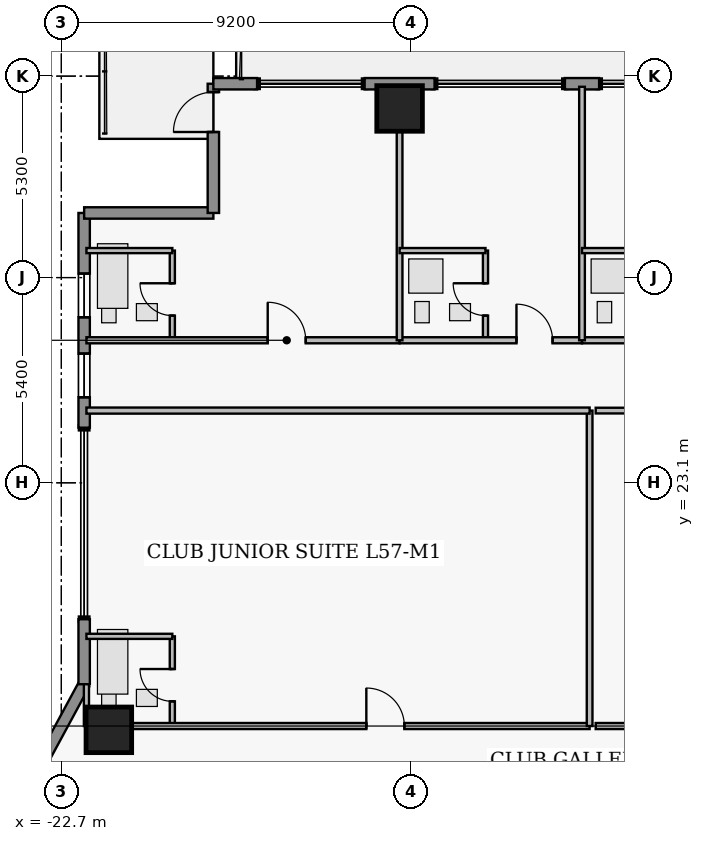
"""IFC4 building model, lengths in metres.
Left out: names, types, materials, properties, quantities, classifications, styles, units other than length and angle.
Written with IfcOpenShell. Run it as: python <this file> out.ifc"""

import sys

from ifc_helpers import new_model, si_unit, direction, frame, frame_2d, origin, origin_2d, place, context, subcontext, project, spatial, rectangle, extrude, element, fill, save


model = new_model("IFC4")
c1 = context("Model", 3, precision=1e-05, world=origin(), true_north=direction((0.0, 1.0)))
c2 = subcontext(c1, "Body", "Model", "MODEL_VIEW")
j1 = project(units=[si_unit("LENGTHUNIT", "METRE"), si_unit("PLANEANGLEUNIT", "RADIAN")], contexts=[c1])
p1 = place(None, origin())
s1 = spatial("IfcSite", under=j1, at=p1, CompositionType="ELEMENT")
p2 = place(p1, origin())
s2 = spatial("IfcBuilding", under=s1, at=p2, CompositionType="ELEMENT")
p3 = place(p2, frame((0.0, 0.0, 226.15)))
s3 = spatial("IfcBuildingStorey", under=s2, at=p3, CompositionType="ELEMENT", Elevation=226.15)
for number, where, z_axis, x_axis in (
    (1, (-13.8, 32.95, 0.0), (0.0, 0.0, 1.0), (1.0, 0.0, 0.0)),
    (2, (-21.45, 16.6, 0.0), (0.0, 0.0, 1.0), (1.0, 0.0, 0.0)),
):
    element("IfcColumn", number, at=place(p3, frame(where, z_axis=z_axis, x_axis=x_axis)), inside=s3, PredefinedType="COLUMN", context=c2, shape_type="SweptSolid", body=[
        extrude(rectangle(XDim=1.2, YDim=1.2, at=origin_2d()), origin(), (0.0, 0.0, 1.0), 3.75),
    ])
p4 = place(p3, frame((-24.7, 13.0, 0.0), z_axis=(0.0, 0.0, 1.0), x_axis=(0.476258655584, 0.879305233114, 0.0)))
e3 = element("IfcWall", 3, at=p4, inside=s3, PredefinedType="STANDARD", context=c2, shape_type="SweptSolid", body=[
    extrude(rectangle(XDim=5.459, YDim=0.3, at=frame_2d((2.729, 0.0))), origin(), (0.0, 0.0, 1.0), 3.53),
])
p5 = place(p3, frame((-22.1, 17.8, 0.0), z_axis=(0.0, 0.0, 1.0), x_axis=(0.0, 1.0, 0.0)))
e4 = element("IfcWall", 4, at=p5, inside=s3, PredefinedType="STANDARD", context=c2, shape_type="SweptSolid", body=[
    extrude(rectangle(XDim=1.71, YDim=0.3, at=frame_2d((0.855, 0.0))), origin(), (0.0, 0.0, 1.0), 3.53),
])
p6 = place(p3, frame((-22.1, 24.55, 0.0), z_axis=(0.0, 0.0, 1.0), x_axis=(0.0, 1.0, 0.0)))
e5 = element("IfcWall", 5, at=p6, inside=s3, PredefinedType="STANDARD", context=c2, shape_type="SweptSolid", body=[
    extrude(rectangle(XDim=5.65, YDim=0.3, at=frame_2d((2.825, 0.0))), origin(), (0.0, 0.0, 1.0), 3.53),
])
p7 = place(p6, frame((0.8, 0.0, 0.95)))
e6 = element("IfcOpeningElement", 6, at=p7, cuts=e5, PredefinedType="OPENING", context=c2, shape_type="SweptSolid", body=[
    extrude(rectangle(XDim=1.15, YDim=1.55, at=frame_2d((0.575, 0.775))), frame((0.0, 0.16, 0.0), z_axis=(0.0, -1.0, 0.0), x_axis=(1.0, 0.0, 0.0)), (0.0, 0.0, 1.0), 0.32),
])
p8 = place(p6, frame((2.905, 0.0, 0.95)))
e7 = element("IfcOpeningElement", 7, at=p8, cuts=e5, PredefinedType="OPENING", context=c2, shape_type="SweptSolid", body=[
    extrude(rectangle(XDim=1.15, YDim=1.55, at=frame_2d((0.575, 0.775))), frame((0.0, 0.16, 0.0), z_axis=(0.0, -1.0, 0.0), x_axis=(1.0, 0.0, 0.0)), (0.0, 0.0, 1.0), 0.32),
])
p9 = place(p3, frame((-22.1, 30.2, 0.0), z_axis=(0.0, 0.0, 1.0), x_axis=(1.0, 0.0, 0.0)))
e8 = element("IfcWall", 8, at=p9, inside=s3, PredefinedType="STANDARD", context=c2, shape_type="SweptSolid", body=[
    extrude(rectangle(XDim=3.4, YDim=0.3, at=frame_2d((1.7, 0.0))), origin(), (0.0, 0.0, 1.0), 3.53),
])
p10 = place(p3, frame((-18.7, 30.2, 0.0), z_axis=(0.0, 0.0, 1.0), x_axis=(0.0, 1.0, 0.0)))
e9 = element("IfcWall", 9, at=p10, inside=s3, PredefinedType="STANDARD", context=c2, shape_type="SweptSolid", body=[
    extrude(rectangle(XDim=3.4, YDim=0.3, at=frame_2d((1.7, 0.0))), origin(), (0.0, 0.0, 1.0), 3.53),
])
p11 = place(p10, frame((2.13, 0.0, 0.0)))
e10 = element("IfcOpeningElement", 10, at=p11, cuts=e9, PredefinedType="OPENING", context=c2, shape_type="SweptSolid", body=[
    extrude(rectangle(XDim=1.05, YDim=2.2, at=frame_2d((0.525, 1.1))), frame((0.0, 0.16, 0.0), z_axis=(0.0, -1.0, 0.0), x_axis=(1.0, 0.0, 0.0)), (0.0, 0.0, 1.0), 0.32),
])
p12 = place(p3, frame((-18.7, 33.6, 0.0), z_axis=(0.0, 0.0, 1.0), x_axis=(1.0, 0.0, 0.0)))
e11 = element("IfcWall", 11, at=p12, inside=s3, PredefinedType="STANDARD", context=c2, shape_type="SweptSolid", body=[
    extrude(rectangle(XDim=1.15, YDim=0.3, at=frame_2d((0.575, 0.0))), origin(), (0.0, 0.0, 1.0), 3.53),
])
p13 = place(p3, frame((-14.72, 33.6, 0.0), z_axis=(0.0, 0.0, 1.0), x_axis=(1.0, 0.0, 0.0)))
e12 = element("IfcWall", 12, at=p13, inside=s3, PredefinedType="STANDARD", context=c2, shape_type="SweptSolid", body=[
    extrude(rectangle(XDim=1.84, YDim=0.3, at=frame_2d((0.92, 0.0))), origin(), (0.0, 0.0, 1.0), 3.53),
])
p14 = place(p3, frame((-9.45, 33.6, 0.0), z_axis=(0.0, 0.0, 1.0), x_axis=(1.0, 0.0, 0.0)))
e13 = element("IfcWall", 13, at=p14, inside=s3, PredefinedType="STANDARD", context=c2, shape_type="SweptSolid", body=[
    extrude(rectangle(XDim=0.9, YDim=0.3, at=frame_2d((0.45, 0.0))), origin(), (0.0, 0.0, 1.0), 3.53),
])
p15 = place(p3, frame((-19.78, 26.85, 0.0), z_axis=(0.0, 0.0, 1.0), x_axis=(0.0, 1.0, 0.0)))
e14 = element("IfcWall", 14, at=p15, inside=s3, PredefinedType="PLUMBINGWALL", context=c2, shape_type="SweptSolid", body=[
    extrude(rectangle(XDim=2.36, YDim=0.135, at=frame_2d((1.18, 0.0))), origin(), (0.0, 0.0, 1.0), 3.53),
])
p16 = place(p15, frame((0.65, 0.0, 0.0)))
e15 = element("IfcOpeningElement", 15, at=p16, cuts=e14, PredefinedType="OPENING", context=c2, shape_type="SweptSolid", body=[
    extrude(rectangle(XDim=0.85, YDim=2.1, at=frame_2d((0.425, 1.05))), frame((0.0, 0.077, 0.0), z_axis=(0.0, -1.0, 0.0), x_axis=(1.0, 0.0, 0.0)), (0.0, 0.0, 1.0), 0.155),
])
p17 = place(p3, frame((-22.04, 26.85, 0.0), z_axis=(0.0, 0.0, 1.0), x_axis=(1.0, 0.0, 0.0)))
e16 = element("IfcWall", 16, at=p17, inside=s3, PredefinedType="PARTITIONING", context=c2, shape_type="SweptSolid", body=[
    extrude(rectangle(XDim=8.24, YDim=0.16, at=frame_2d((4.12, 0.0))), origin(), (0.0, 0.0, 1.0), 3.53),
])
p18 = place(p17, frame((4.77, 0.0, 0.0)))
e17 = element("IfcOpeningElement", 17, at=p18, cuts=e16, PredefinedType="OPENING", context=c2, shape_type="SweptSolid", body=[
    extrude(rectangle(XDim=1.0, YDim=2.15, at=frame_2d((0.5, 1.075))), frame((0.0, 0.09, 0.0), z_axis=(0.0, -1.0, 0.0), x_axis=(1.0, 0.0, 0.0)), (0.0, 0.0, 1.0), 0.18),
])
p19 = place(p3, frame((-11.54, 26.85, 0.0), z_axis=(0.0, 0.0, 1.0), x_axis=(0.0, 1.0, 0.0)))
e18 = element("IfcWall", 18, at=p19, inside=s3, PredefinedType="PLUMBINGWALL", context=c2, shape_type="SweptSolid", body=[
    extrude(rectangle(XDim=2.36, YDim=0.135, at=frame_2d((1.18, 0.0))), origin(), (0.0, 0.0, 1.0), 3.53),
])
p20 = place(p19, frame((0.65, 0.0, 0.0)))
e19 = element("IfcOpeningElement", 19, at=p20, cuts=e18, PredefinedType="OPENING", context=c2, shape_type="SweptSolid", body=[
    extrude(rectangle(XDim=0.85, YDim=2.1, at=frame_2d((0.425, 1.05))), frame((0.0, 0.077, 0.0), z_axis=(0.0, -1.0, 0.0), x_axis=(1.0, 0.0, 0.0)), (0.0, 0.0, 1.0), 0.155),
])
p21 = place(p3, frame((-13.8, 26.85, 0.0), z_axis=(0.0, 0.0, 1.0), x_axis=(1.0, 0.0, 0.0)))
e20 = element("IfcWall", 20, at=p21, inside=s3, PredefinedType="PARTITIONING", context=c2, shape_type="SweptSolid", body=[
    extrude(rectangle(XDim=4.8, YDim=0.16, at=frame_2d((2.4, 0.0))), origin(), (0.0, 0.0, 1.0), 3.53),
])
p22 = place(p21, frame((3.075, 0.0, 0.0)))
e21 = element("IfcOpeningElement", 21, at=p22, cuts=e20, PredefinedType="OPENING", context=c2, shape_type="SweptSolid", body=[
    extrude(rectangle(XDim=0.95, YDim=2.15, at=frame_2d((0.475, 1.075))), frame((0.0, 0.09, 0.0), z_axis=(0.0, -1.0, 0.0), x_axis=(1.0, 0.0, 0.0)), (0.0, 0.0, 1.0), 0.18),
])
p23 = place(p3, frame((-9.0, 26.85, 0.0), z_axis=(0.0, 0.0, 1.0), x_axis=(1.0, 0.0, 0.0)))
e22 = element("IfcWall", 22, at=p23, inside=s3, PredefinedType="PARTITIONING", context=c2, shape_type="SweptSolid", body=[
    extrude(rectangle(XDim=4.6, YDim=0.16, at=frame_2d((2.3, 0.0))), origin(), (0.0, 0.0, 1.0), 3.53),
])
p24 = place(p23, frame((2.975, 0.0, 0.0)))
e23 = element("IfcOpeningElement", 23, at=p24, cuts=e22, PredefinedType="OPENING", context=c2, shape_type="SweptSolid", body=[
    extrude(rectangle(XDim=0.95, YDim=2.15, at=frame_2d((0.475, 1.075))), frame((0.0, 0.09, 0.0), z_axis=(0.0, -1.0, 0.0), x_axis=(1.0, 0.0, 0.0)), (0.0, 0.0, 1.0), 0.18),
])
p25 = place(p3, frame((-19.78, 16.7, 0.0), z_axis=(0.0, 0.0, 1.0), x_axis=(0.0, 1.0, 0.0)))
e24 = element("IfcWall", 24, at=p25, inside=s3, PredefinedType="PLUMBINGWALL", context=c2, shape_type="SweptSolid", body=[
    extrude(rectangle(XDim=2.36, YDim=0.135, at=frame_2d((1.18, 0.0))), origin(), (0.0, 0.0, 1.0), 3.53),
])
p26 = place(p25, frame((0.65, 0.0, 0.0)))
e25 = element("IfcOpeningElement", 25, at=p26, cuts=e24, PredefinedType="OPENING", context=c2, shape_type="SweptSolid", body=[
    extrude(rectangle(XDim=0.85, YDim=2.1, at=frame_2d((0.425, 1.05))), frame((0.0, 0.077, 0.0), z_axis=(0.0, -1.0, 0.0), x_axis=(1.0, 0.0, 0.0)), (0.0, 0.0, 1.0), 0.155),
])
p27 = place(p3, frame((-22.04, 16.7, 0.0), z_axis=(0.0, 0.0, 1.0), x_axis=(1.0, 0.0, 0.0)))
e26 = element("IfcWall", 26, at=p27, inside=s3, PredefinedType="PARTITIONING", context=c2, shape_type="SweptSolid", body=[
    extrude(rectangle(XDim=13.24, YDim=0.16, at=frame_2d((6.62, 0.0))), origin(), (0.0, 0.0, 1.0), 3.124),
])
p28 = place(p27, frame((7.365, 0.0, 0.0)))
e27 = element("IfcOpeningElement", 27, at=p28, cuts=e26, PredefinedType="OPENING", context=c2, shape_type="SweptSolid", body=[
    extrude(rectangle(XDim=1.0, YDim=2.15, at=frame_2d((0.5, 1.075))), frame((0.0, 0.09, 0.0), z_axis=(0.0, -1.0, 0.0), x_axis=(1.0, 0.0, 0.0)), (0.0, 0.0, 1.0), 0.18),
])
p29 = place(p3, frame((-8.64, 16.7, 0.0), z_axis=(0.0, 0.0, 1.0), x_axis=(1.0, 0.0, 0.0)))
e28 = element("IfcWall", 28, at=p29, inside=s3, PredefinedType="PARTITIONING", context=c2, shape_type="SweptSolid", body=[
    extrude(rectangle(XDim=7.66, YDim=0.16, at=frame_2d((3.83, 0.0))), origin(), (0.0, 0.0, 1.0), 3.124),
])
p30 = place(p29, frame((5.85, 0.0, 0.0)))
e29 = element("IfcOpeningElement", 29, at=p30, cuts=e28, PredefinedType="OPENING", context=c2, shape_type="SweptSolid", body=[
    extrude(rectangle(XDim=1.08, YDim=2.18, at=frame_2d((0.54, 1.09))), frame((0.0, 0.09, 0.0), z_axis=(0.0, -1.0, 0.0), x_axis=(1.0, 0.0, 0.0)), (0.0, 0.0, 1.0), 0.18),
])
p31 = place(p3, frame((-22.04, 29.21, 0.0), z_axis=(0.0, 0.0, 1.0), x_axis=(1.0, 0.0, 0.0)))
e30 = element("IfcWall", 30, at=p31, inside=s3, PredefinedType="PLUMBINGWALL", context=c2, shape_type="SweptSolid", body=[
    extrude(rectangle(XDim=2.26, YDim=0.135, at=frame_2d((1.13, 0.0))), origin(), (0.0, 0.0, 1.0), 3.53),
])
p32 = place(p3, frame((-13.8, 26.85, 0.0), z_axis=(0.0, 0.0, 1.0), x_axis=(0.0, 1.0, 0.0)))
e31 = element("IfcWall", 31, at=p32, inside=s3, PredefinedType="PARTITIONING", context=c2, shape_type="SweptSolid", body=[
    extrude(rectangle(XDim=6.67, YDim=0.15, at=frame_2d((3.335, 0.0))), origin(), (0.0, 0.0, 1.0), 2.519),
])
p33 = place(p3, frame((-13.8, 29.21, 0.0), z_axis=(0.0, 0.0, 1.0), x_axis=(1.0, 0.0, 0.0)))
e32 = element("IfcWall", 32, at=p33, inside=s3, PredefinedType="PLUMBINGWALL", context=c2, shape_type="SweptSolid", body=[
    extrude(rectangle(XDim=2.26, YDim=0.135, at=frame_2d((1.13, 0.0))), origin(), (0.0, 0.0, 1.0), 3.53),
])
p34 = place(p3, frame((-9.0, 26.85, 0.0), z_axis=(0.0, 0.0, 1.0), x_axis=(0.0, 1.0, 0.0)))
e33 = element("IfcWall", 33, at=p34, inside=s3, PredefinedType="PARTITIONING", context=c2, shape_type="SweptSolid", body=[
    extrude(rectangle(XDim=6.67, YDim=0.15, at=frame_2d((3.335, 0.0))), origin(), (0.0, 0.0, 1.0), 3.53),
])
for number, where, z_axis, x_axis in (
    (34, (-9.0, 29.21, 0.0), (0.0, 0.0, 1.0), (1.0, 0.0, 0.0)),
    (35, (-22.04, 19.06, 0.0), (0.0, 0.0, 1.0), (1.0, 0.0, 0.0)),
):
    element("IfcWall", number, at=place(p3, frame(where, z_axis=z_axis, x_axis=x_axis)), inside=s3, PredefinedType="PLUMBINGWALL", context=c2, shape_type="SweptSolid", body=[
        extrude(rectangle(XDim=2.26, YDim=0.135, at=frame_2d((1.13, 0.0))), origin(), (0.0, 0.0, 1.0), 3.53),
    ])
p35 = place(p3, frame((-22.04, 16.7, 0.0), z_axis=(0.0, 0.0, 1.0), x_axis=(0.0, 1.0, 0.0)))
e36 = element("IfcWall", 36, at=p35, inside=s3, PredefinedType="PLUMBINGWALL", context=c2, shape_type="SweptSolid", body=[
    extrude(rectangle(XDim=1.1, YDim=0.135, at=frame_2d((0.55, 0.0))), origin(), (0.0, 0.0, 1.0), 3.53),
])
p36 = place(p3, frame((-8.8, 16.7, 0.0), z_axis=(0.0, 0.0, 1.0), x_axis=(0.0, 1.0, 0.0)))
e37 = element("IfcWall", 37, at=p36, inside=s3, PredefinedType="PARTITIONING", context=c2, shape_type="SweptSolid", body=[
    extrude(rectangle(XDim=8.3, YDim=0.15, at=frame_2d((4.15, 0.0))), origin(), (0.0, 0.0, 1.0), 3.53),
])
p37 = place(p3, frame((-22.04, 25.0, 0.0), z_axis=(0.0, 0.0, 1.0), x_axis=(1.0, 0.0, 0.0)))
e38 = element("IfcWall", 38, at=p37, inside=s3, PredefinedType="PARTITIONING", context=c2, shape_type="SweptSolid", body=[
    extrude(rectangle(XDim=13.24, YDim=0.16, at=frame_2d((6.62, 0.0))), origin(), (0.0, 0.0, 1.0), 3.124),
])
p38 = place(p3, frame((-8.64, 25.0, 0.0), z_axis=(0.0, 0.0, 1.0), x_axis=(1.0, 0.0, 0.0)))
e39 = element("IfcWall", 39, at=p38, inside=s3, PredefinedType="PARTITIONING", context=c2, shape_type="SweptSolid", body=[
    extrude(rectangle(XDim=7.66, YDim=0.15, at=frame_2d((3.83, 0.0))), origin(), (0.0, 0.0, 1.0), 3.124),
])
p39 = place(p7, origin())
e40 = element("IfcWindow", 40, at=p39, inside=s3, PartitioningType="SINGLE_PANEL", PredefinedType="WINDOW", context=c2, shape_type="SweptSolid", body=[
    extrude(rectangle(XDim=1.15, YDim=1.55, at=frame_2d((0.575, 0.775))), frame((0.0, 0.03, 0.0), z_axis=(0.0, -1.0, 0.0), x_axis=(1.0, 0.0, 0.0)), (0.0, 0.0, 1.0), 0.06),
])
fill(e6, e40)
p40 = place(p8, origin())
e41 = element("IfcWindow", 41, at=p40, inside=s3, PartitioningType="SINGLE_PANEL", PredefinedType="WINDOW", context=c2, shape_type="SweptSolid", body=[
    extrude(rectangle(XDim=1.15, YDim=1.55, at=frame_2d((0.575, 0.775))), frame((0.0, 0.03, 0.0), z_axis=(0.0, -1.0, 0.0), x_axis=(1.0, 0.0, 0.0)), (0.0, 0.0, 1.0), 0.06),
])
fill(e7, e41)
p41 = place(p11, origin())
e42 = element("IfcDoor", 42, at=p41, inside=s3, OperationType="SINGLE_SWING_LEFT", PredefinedType="DOOR", context=c2, shape_type="SweptSolid", body=[
    extrude(rectangle(XDim=1.05, YDim=2.2, at=frame_2d((0.525, 1.1))), frame((0.0, 0.025, 0.0), z_axis=(0.0, -1.0, 0.0), x_axis=(1.0, 0.0, 0.0)), (0.0, 0.0, 1.0), 0.05),
])
fill(e10, e42)
p42 = place(p16, origin())
e43 = element("IfcDoor", 43, at=p42, inside=s3, OperationType="SINGLE_SWING_RIGHT", PredefinedType="DOOR", context=c2, shape_type="SweptSolid", body=[
    extrude(rectangle(XDim=0.85, YDim=2.1, at=frame_2d((0.425, 1.05))), frame((0.0, 0.025, 0.0), z_axis=(0.0, -1.0, 0.0), x_axis=(1.0, 0.0, 0.0)), (0.0, 0.0, 1.0), 0.05),
])
fill(e15, e43)
p43 = place(p18, origin())
e44 = element("IfcDoor", 44, at=p43, inside=s3, OperationType="SINGLE_SWING_LEFT", PredefinedType="DOOR", context=c2, shape_type="SweptSolid", body=[
    extrude(rectangle(XDim=1.0, YDim=2.15, at=frame_2d((0.5, 1.075))), frame((0.0, 0.025, 0.0), z_axis=(0.0, -1.0, 0.0), x_axis=(1.0, 0.0, 0.0)), (0.0, 0.0, 1.0), 0.05),
])
fill(e17, e44)
p44 = place(p20, origin())
e45 = element("IfcDoor", 45, at=p44, inside=s3, OperationType="SINGLE_SWING_RIGHT", PredefinedType="DOOR", context=c2, shape_type="SweptSolid", body=[
    extrude(rectangle(XDim=0.85, YDim=2.1, at=frame_2d((0.425, 1.05))), frame((0.0, 0.025, 0.0), z_axis=(0.0, -1.0, 0.0), x_axis=(1.0, 0.0, 0.0)), (0.0, 0.0, 1.0), 0.05),
])
fill(e19, e45)
p45 = place(p22, origin())
e46 = element("IfcDoor", 46, at=p45, inside=s3, OperationType="SINGLE_SWING_LEFT", PredefinedType="DOOR", context=c2, shape_type="SweptSolid", body=[
    extrude(rectangle(XDim=0.95, YDim=2.15, at=frame_2d((0.475, 1.075))), frame((0.0, 0.025, 0.0), z_axis=(0.0, -1.0, 0.0), x_axis=(1.0, 0.0, 0.0)), (0.0, 0.0, 1.0), 0.05),
])
fill(e21, e46)
p46 = place(p26, origin())
e47 = element("IfcDoor", 47, at=p46, inside=s3, OperationType="SINGLE_SWING_RIGHT", PredefinedType="DOOR", context=c2, shape_type="SweptSolid", body=[
    extrude(rectangle(XDim=0.85, YDim=2.1, at=frame_2d((0.425, 1.05))), frame((0.0, 0.025, 0.0), z_axis=(0.0, -1.0, 0.0), x_axis=(1.0, 0.0, 0.0)), (0.0, 0.0, 1.0), 0.05),
])
fill(e25, e47)
p47 = place(p28, origin())
e48 = element("IfcDoor", 48, at=p47, inside=s3, OperationType="SINGLE_SWING_LEFT", PredefinedType="DOOR", context=c2, shape_type="SweptSolid", body=[
    extrude(rectangle(XDim=1.0, YDim=2.15, at=frame_2d((0.5, 1.075))), frame((0.0, 0.025, 0.0), z_axis=(0.0, -1.0, 0.0), x_axis=(1.0, 0.0, 0.0)), (0.0, 0.0, 1.0), 0.05),
])
fill(e27, e48)
save(model, sys.argv[1])
